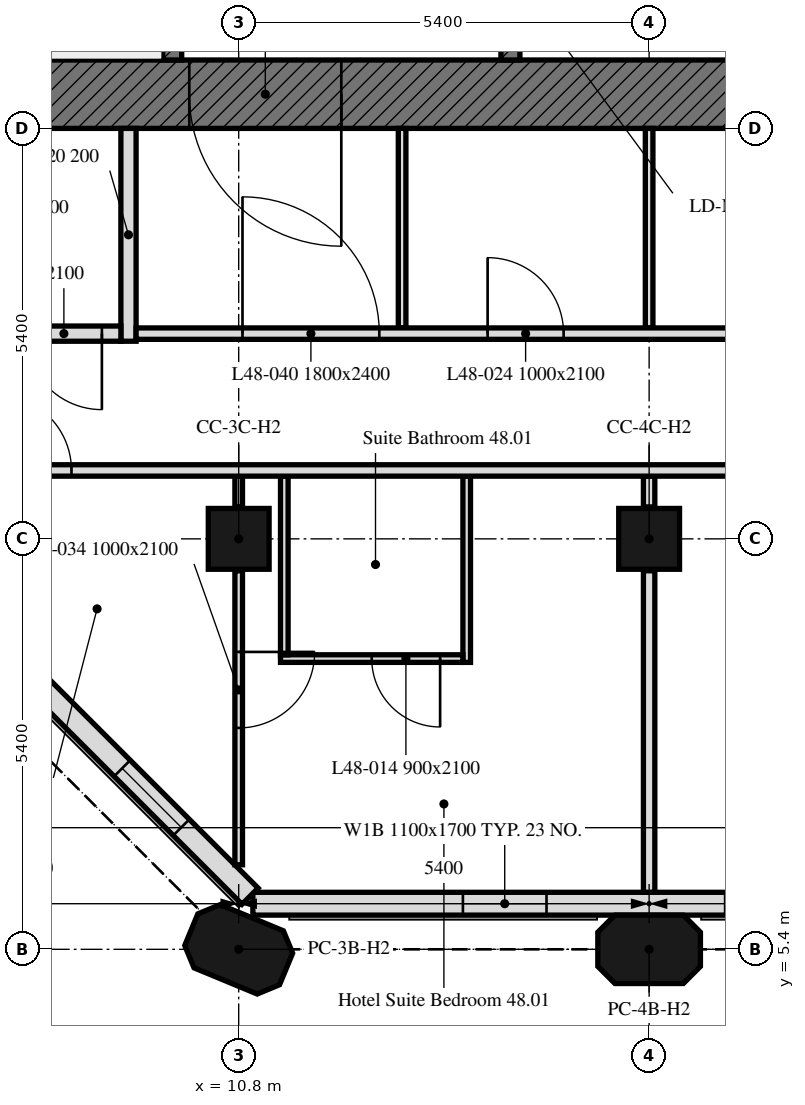
"""IFC4 building model, lengths in metres.
Left out: names, types, materials, properties, quantities, classifications, styles, units other than length and angle.
Written with IfcOpenShell. Run it as: python <this file> out.ifc"""

import sys

from ifc_helpers import new_model, si_unit, direction, frame, frame_2d, origin, origin_2d, place, context, subcontext, project, spatial, polyline, rectangle, outline, extrude, element, fill, save


model = new_model("IFC4")
c1 = context("Model", 3, precision=1e-05, world=origin(), true_north=direction((0.0, 1.0)))
c2 = subcontext(c1, "Body", "Model", "MODEL_VIEW")
j1 = project(units=[si_unit("LENGTHUNIT", "METRE"), si_unit("PLANEANGLEUNIT", "RADIAN")], contexts=[c1])
p1 = place(None, origin())
s1 = spatial("IfcSite", under=j1, at=p1, CompositionType="ELEMENT")
p2 = place(p1, origin())
s2 = spatial("IfcBuilding", under=s1, at=p2, CompositionType="ELEMENT")
p3 = place(p2, frame((0.0, 0.0, 197.2)))
s3 = spatial("IfcBuildingStorey", under=s2, at=p3, CompositionType="ELEMENT", Elevation=197.2)
for number, where, z_axis, x_axis in (
    (1, (10.8, 5.4, 0.0), (0.0, 0.0, 1.0), (-0.924, 0.383, 0.0)),
    (2, (16.2, 5.4, 0.0), (0.0, 0.0, 1.0), (1.0, 0.0, 0.0)),
):
    element("IfcColumn", number, at=place(p3, frame(where, z_axis=z_axis, x_axis=x_axis)), inside=s3, PredefinedType="COLUMN", context=c2, shape_type="SweptSolid", body=[
        extrude(outline(polyline([(-0.45, -0.45), (0.45, -0.45), (0.675, -0.225), (0.675, 0.225), (0.45, 0.45), (-0.45, 0.45), (-0.675, 0.225), (-0.675, -0.225), (-0.45, -0.45)])), origin(), (0.0, 0.0, 1.0), 3.0),
    ])
for number, where, z_axis, x_axis in (
    (3, (10.8, 10.8, 0.0), (0.0, 0.0, 1.0), (1.0, 0.0, 0.0)),
    (4, (16.2, 10.8, 0.0), (0.0, 0.0, 1.0), (1.0, 0.0, 0.0)),
):
    element("IfcColumn", number, at=place(p3, frame(where, z_axis=z_axis, x_axis=x_axis)), inside=s3, PredefinedType="COLUMN", context=c2, shape_type="SweptSolid", body=[
        extrude(rectangle(XDim=0.8, YDim=0.8, at=origin_2d()), origin(), (0.0, 0.0, 1.0), 3.0),
    ])
p4 = place(p3, frame((10.986, 6.0, 0.0), z_axis=(0.0, 0.0, 1.0), x_axis=(1.0, 0.0, 0.0)))
e5 = element("IfcWall", 5, at=p4, inside=s3, PredefinedType="SOLIDWALL", context=c2, shape_type="SweptSolid", body=[
    extrude(rectangle(XDim=32.027, YDim=0.3, at=frame_2d((16.014, 0.0))), origin(), (0.0, 0.0, 1.0), 3.0),
])
p5 = place(p4, frame((2.764, 0.0, 0.9)))
e6 = element("IfcOpeningElement", 6, at=p5, cuts=e5, PredefinedType="OPENING", context=c2, shape_type="SweptSolid", body=[
    extrude(rectangle(XDim=1.1, YDim=1.7, at=frame_2d((0.55, 0.85))), frame((0.0, 0.16, 0.0), z_axis=(0.0, -1.0, 0.0), x_axis=(1.0, 0.0, 0.0)), (0.0, 0.0, 1.0), 0.32),
])
p6 = place(p4, frame((6.214, 0.0, 0.9)))
e7 = element("IfcOpeningElement", 7, at=p6, cuts=e5, PredefinedType="OPENING", context=c2, shape_type="SweptSolid", body=[
    extrude(rectangle(XDim=3.4, YDim=1.7, at=frame_2d((1.7, 0.85))), frame((0.0, 0.16, 0.0), z_axis=(0.0, -1.0, 0.0), x_axis=(1.0, 0.0, 0.0)), (0.0, 0.0, 1.0), 0.32),
])
p7 = place(p4, frame((13.564, 0.0, 0.9)))
e8 = element("IfcOpeningElement", 8, at=p7, cuts=e5, PredefinedType="OPENING", context=c2, shape_type="SweptSolid", body=[
    extrude(rectangle(XDim=1.1, YDim=1.7, at=frame_2d((0.55, 0.85))), frame((0.0, 0.16, 0.0), z_axis=(0.0, -1.0, 0.0), x_axis=(1.0, 0.0, 0.0)), (0.0, 0.0, 1.0), 0.32),
])
p8 = place(p4, frame((17.014, 0.0, 0.9)))
e9 = element("IfcOpeningElement", 9, at=p8, cuts=e5, PredefinedType="OPENING", context=c2, shape_type="SweptSolid", body=[
    extrude(rectangle(XDim=3.4, YDim=1.7, at=frame_2d((1.7, 0.85))), frame((0.0, 0.16, 0.0), z_axis=(0.0, -1.0, 0.0), x_axis=(1.0, 0.0, 0.0)), (0.0, 0.0, 1.0), 0.32),
])
p9 = place(p4, frame((24.364, 0.0, 0.9)))
e10 = element("IfcOpeningElement", 10, at=p9, cuts=e5, PredefinedType="OPENING", context=c2, shape_type="SweptSolid", body=[
    extrude(rectangle(XDim=1.1, YDim=1.7, at=frame_2d((0.55, 0.85))), frame((0.0, 0.16, 0.0), z_axis=(0.0, -1.0, 0.0), x_axis=(1.0, 0.0, 0.0)), (0.0, 0.0, 1.0), 0.32),
])
p10 = place(p4, frame((27.814, 0.0, 0.9)))
e11 = element("IfcOpeningElement", 11, at=p10, cuts=e5, PredefinedType="OPENING", context=c2, shape_type="SweptSolid", body=[
    extrude(rectangle(XDim=3.4, YDim=1.7, at=frame_2d((1.7, 0.85))), frame((0.0, 0.16, 0.0), z_axis=(0.0, -1.0, 0.0), x_axis=(1.0, 0.0, 0.0)), (0.0, 0.0, 1.0), 0.32),
])
p11 = place(p3, frame((6.099, 10.949, 0.0), z_axis=(0.0, 0.0, 1.0), x_axis=(0.707106781187, -0.707106781187, 0.0)))
e12 = element("IfcWall", 12, at=p11, inside=s3, PredefinedType="SOLIDWALL", context=c2, shape_type="SweptSolid", body=[
    extrude(rectangle(XDim=6.86, YDim=0.3, at=frame_2d((3.43, 0.0))), origin(), (0.0, 0.0, 1.0), 3.0),
])
p12 = place(p11, frame((1.28, 0.0, 0.9)))
e13 = element("IfcOpeningElement", 13, at=p12, cuts=e12, PredefinedType="OPENING", context=c2, shape_type="SweptSolid", body=[
    extrude(rectangle(XDim=1.1, YDim=1.7, at=frame_2d((0.55, 0.85))), frame((0.0, 0.16, 0.0), z_axis=(0.0, -1.0, 0.0), x_axis=(1.0, 0.0, 0.0)), (0.0, 0.0, 1.0), 0.32),
])
p13 = place(p11, frame((4.48, 0.0, 0.9)))
e14 = element("IfcOpeningElement", 14, at=p13, cuts=e12, PredefinedType="OPENING", context=c2, shape_type="SweptSolid", body=[
    extrude(rectangle(XDim=1.1, YDim=1.7, at=frame_2d((0.55, 0.85))), frame((0.0, 0.16, 0.0), z_axis=(0.0, -1.0, 0.0), x_axis=(1.0, 0.0, 0.0)), (0.0, 0.0, 1.0), 0.32),
])
p14 = place(p3, frame((17.7, 16.65, 0.0), z_axis=(0.0, 0.0, 1.0), x_axis=(-1.0, 0.0, 0.0)))
e15 = element("IfcWall", 15, at=p14, inside=s3, PredefinedType="SOLIDWALL", context=c2, shape_type="SweptSolid", body=[
    extrude(rectangle(XDim=11.1, YDim=0.9, at=frame_2d((5.55, 0.0))), origin(), (0.0, 0.0, 1.0), 3.0),
])
p15 = place(p14, frame((5.55, 0.0, 0.0)))
e16 = element("IfcOpeningElement", 16, at=p15, cuts=e15, PredefinedType="OPENING", context=c2, shape_type="SweptSolid", body=[
    extrude(rectangle(XDim=2.0, YDim=2.4, at=frame_2d((1.0, 1.2))), frame((0.0, 0.45, 0.0), z_axis=(0.0, -1.0, 0.0), x_axis=(1.0, 0.0, 0.0)), (0.0, 0.0, 1.0), 0.9),
])
p16 = place(p3, frame((9.925, 17.1, 0.0), z_axis=(0.0, 0.0, 1.0), x_axis=(0.0, 1.0, 0.0)))
e17 = element("IfcWall", 17, at=p16, inside=s3, PredefinedType="SOLIDWALL", context=c2, shape_type="SweptSolid", body=[
    extrude(rectangle(XDim=14.4, YDim=0.25, at=frame_2d((7.2, 0.0))), origin(), (0.0, 0.0, 1.0), 3.0),
])
p17 = place(p16, frame((4.6, 0.0, 0.0)))
e18 = element("IfcOpeningElement", 18, at=p17, cuts=e17, PredefinedType="OPENING", context=c2, shape_type="SweptSolid", body=[
    extrude(rectangle(XDim=1.0, YDim=2.1, at=frame_2d((0.5, 1.05))), frame((0.0, 0.125, 0.0), z_axis=(0.0, -1.0, 0.0), x_axis=(1.0, 0.0, 0.0)), (0.0, 0.0, 1.0), 0.25),
])
p18 = place(p16, frame((7.062, 0.0, 0.0)))
e19 = element("IfcOpeningElement", 19, at=p18, cuts=e17, PredefinedType="OPENING", context=c2, shape_type="SweptSolid", body=[
    extrude(rectangle(XDim=1.2, YDim=2.1, at=frame_2d((0.6, 1.05))), frame((0.0, 0.125, 0.0), z_axis=(0.0, -1.0, 0.0), x_axis=(1.0, 0.0, 0.0)), (0.0, 0.0, 1.0), 0.25),
])
p19 = place(p16, frame((9.472, 0.0, 0.0)))
e20 = element("IfcOpeningElement", 20, at=p19, cuts=e17, PredefinedType="OPENING", context=c2, shape_type="SweptSolid", body=[
    extrude(rectangle(XDim=0.9, YDim=2.1, at=frame_2d((0.45, 1.05))), frame((0.0, 0.125, 0.0), z_axis=(0.0, -1.0, 0.0), x_axis=(1.0, 0.0, 0.0)), (0.0, 0.0, 1.0), 0.25),
])
p20 = place(p16, frame((10.779, 0.0, 0.0)))
e21 = element("IfcOpeningElement", 21, at=p20, cuts=e17, PredefinedType="OPENING", context=c2, shape_type="SweptSolid", body=[
    extrude(rectangle(XDim=0.9, YDim=2.1, at=frame_2d((0.45, 1.05))), frame((0.0, 0.125, 0.0), z_axis=(0.0, -1.0, 0.0), x_axis=(1.0, 0.0, 0.0)), (0.0, 0.0, 1.0), 0.25),
])
p21 = place(p16, frame((12.048, 0.0, 0.0)))
e22 = element("IfcOpeningElement", 22, at=p21, cuts=e17, PredefinedType="OPENING", context=c2, shape_type="SweptSolid", body=[
    extrude(rectangle(XDim=0.9, YDim=2.1, at=frame_2d((0.45, 1.05))), frame((0.0, 0.125, 0.0), z_axis=(0.0, -1.0, 0.0), x_axis=(1.0, 0.0, 0.0)), (0.0, 0.0, 1.0), 0.25),
])
p22 = place(p16, frame((13.354, 0.0, 0.0)))
e23 = element("IfcOpeningElement", 23, at=p22, cuts=e17, PredefinedType="OPENING", context=c2, shape_type="SweptSolid", body=[
    extrude(rectangle(XDim=0.9, YDim=2.1, at=frame_2d((0.45, 1.05))), frame((0.0, 0.125, 0.0), z_axis=(0.0, -1.0, 0.0), x_axis=(1.0, 0.0, 0.0)), (0.0, 0.0, 1.0), 0.25),
])
p23 = place(p3, frame((14.375, 17.1, 0.0), z_axis=(0.0, 0.0, 1.0), x_axis=(0.0, 1.0, 0.0)))
e24 = element("IfcWall", 24, at=p23, inside=s3, PredefinedType="SOLIDWALL", context=c2, shape_type="SweptSolid", body=[
    extrude(rectangle(XDim=14.4, YDim=0.25, at=frame_2d((7.2, 0.0))), origin(), (0.0, 0.0, 1.0), 3.0),
])
p24 = place(p23, frame((13.15, 0.0, 0.0)))
e25 = element("IfcOpeningElement", 25, at=p24, cuts=e24, PredefinedType="OPENING", context=c2, shape_type="SweptSolid", body=[
    extrude(rectangle(XDim=1.0, YDim=2.1, at=frame_2d((0.5, 1.05))), frame((0.0, 0.125, 0.0), z_axis=(0.0, -1.0, 0.0), x_axis=(1.0, 0.0, 0.0)), (0.0, 0.0, 1.0), 0.25),
])
p25 = place(p23, frame((0.6, 0.0, 0.0)))
e26 = element("IfcOpeningElement", 26, at=p25, cuts=e24, PredefinedType="OPENING", context=c2, shape_type="SweptSolid", body=[
    extrude(rectangle(XDim=1.1, YDim=2.1, at=frame_2d((0.55, 1.05))), frame((0.0, 0.125, 0.0), z_axis=(0.0, -1.0, 0.0), x_axis=(1.0, 0.0, 0.0)), (0.0, 0.0, 1.0), 0.25),
])
p26 = place(p23, frame((3.25, 0.0, 0.0)))
e27 = element("IfcOpeningElement", 27, at=p26, cuts=e24, PredefinedType="OPENING", context=c2, shape_type="SweptSolid", body=[
    extrude(rectangle(XDim=0.9, YDim=2.1, at=frame_2d((0.45, 1.05))), frame((0.0, 0.125, 0.0), z_axis=(0.0, -1.0, 0.0), x_axis=(1.0, 0.0, 0.0)), (0.0, 0.0, 1.0), 0.25),
])
p27 = place(p3, frame((16.2, 6.151, 0.0), z_axis=(0.0, 0.0, 1.0), x_axis=(0.0, 1.0, 0.0)))
e28 = element("IfcWall", 28, at=p27, inside=s3, PredefinedType="PARTITIONING", context=c2, shape_type="SweptSolid", body=[
    extrude(rectangle(XDim=4.229, YDim=0.15, at=frame_2d((2.115, 0.0))), origin(), (0.0, 0.0, 1.0), 3.0),
])
p28 = place(p3, frame((16.2, 11.22, 0.0), z_axis=(0.0, 0.0, 1.0), x_axis=(0.0, 1.0, 0.0)))
e29 = element("IfcWall", 29, at=p28, inside=s3, PredefinedType="PARTITIONING", context=c2, shape_type="SweptSolid", body=[
    extrude(rectangle(XDim=0.405, YDim=0.15, at=frame_2d((0.203, 0.0))), origin(), (0.0, 0.0, 1.0), 3.0),
])
p29 = place(p3, frame((13.8, 11.625, 0.0), z_axis=(0.0, 0.0, 1.0), x_axis=(0.0, -1.0, 0.0)))
e30 = element("IfcWall", 30, at=p29, inside=s3, PredefinedType="PARTITIONING", context=c2, shape_type="SweptSolid", body=[
    extrude(rectangle(XDim=2.45, YDim=0.1, at=frame_2d((1.225, 0.0))), origin(), (0.0, 0.0, 1.0), 3.0),
])
p30 = place(p3, frame((13.75, 9.225, 0.0), z_axis=(0.0, 0.0, 1.0), x_axis=(-1.0, 0.0, 0.0)))
e31 = element("IfcWall", 31, at=p30, inside=s3, PredefinedType="PARTITIONING", context=c2, shape_type="SweptSolid", body=[
    extrude(rectangle(XDim=2.4, YDim=0.1, at=frame_2d((1.2, 0.0))), origin(), (0.0, 0.0, 1.0), 3.0),
])
p31 = place(p30, frame((0.3, 0.0, 0.0)))
e32 = element("IfcOpeningElement", 32, at=p31, cuts=e31, PredefinedType="OPENING", context=c2, shape_type="SweptSolid", body=[
    extrude(rectangle(XDim=0.9, YDim=2.1, at=frame_2d((0.45, 1.05))), frame((0.0, 0.05, 0.0), z_axis=(0.0, -1.0, 0.0), x_axis=(1.0, 0.0, 0.0)), (0.0, 0.0, 1.0), 0.1),
])
p32 = place(p3, frame((11.4, 9.275, 0.0), z_axis=(0.0, 0.0, 1.0), x_axis=(0.0, 1.0, 0.0)))
e33 = element("IfcWall", 33, at=p32, inside=s3, PredefinedType="PARTITIONING", context=c2, shape_type="SweptSolid", body=[
    extrude(rectangle(XDim=2.35, YDim=0.1, at=frame_2d((1.175, 0.0))), origin(), (0.0, 0.0, 1.0), 3.0),
])
p33 = place(p3, frame((10.8, 11.625, 0.0), z_axis=(0.0, 0.0, 1.0), x_axis=(0.0, -1.0, 0.0)))
e34 = element("IfcWall", 34, at=p33, inside=s3, PredefinedType="PARTITIONING", context=c2, shape_type="SweptSolid", body=[
    extrude(rectangle(XDim=0.405, YDim=0.1, at=frame_2d((0.203, 0.0))), origin(), (0.0, 0.0, 1.0), 3.0),
])
p34 = place(p3, frame((10.8, 10.38, 0.0), z_axis=(0.0, 0.0, 1.0), x_axis=(0.0, -1.0, 0.0)))
e35 = element("IfcWall", 35, at=p34, inside=s3, PredefinedType="PARTITIONING", context=c2, shape_type="SweptSolid", body=[
    extrude(rectangle(XDim=3.868, YDim=0.1, at=frame_2d((1.934, 0.0))), origin(), (0.0, 0.0, 1.0), 3.0),
])
p35 = place(p34, frame((1.067, 0.0, 0.0)))
e36 = element("IfcOpeningElement", 36, at=p35, cuts=e35, PredefinedType="OPENING", context=c2, shape_type="SweptSolid", body=[
    extrude(rectangle(XDim=1.0, YDim=2.1, at=frame_2d((0.5, 1.05))), frame((0.0, 0.05, 0.0), z_axis=(0.0, -1.0, 0.0), x_axis=(1.0, 0.0, 0.0)), (0.0, 0.0, 1.0), 0.1),
])
p36 = place(p3, frame((6.151, 11.7, 0.0), z_axis=(0.0, 0.0, 1.0), x_axis=(1.0, 0.0, 0.0)))
e37 = element("IfcWall", 37, at=p36, inside=s3, PredefinedType="PARTITIONING", context=c2, shape_type="SweptSolid", body=[
    extrude(rectangle(XDim=41.698, YDim=0.15, at=frame_2d((20.849, 0.0))), origin(), (0.0, 0.0, 1.0), 3.0),
])
p37 = place(p36, frame((17.649, 0.0, 0.0)))
e38 = element("IfcOpeningElement", 38, at=p37, cuts=e37, PredefinedType="OPENING", context=c2, shape_type="SweptSolid", body=[
    extrude(rectangle(XDim=1.0, YDim=2.1, at=frame_2d((0.5, 1.05))), frame((0.0, 0.075, 0.0), z_axis=(0.0, -1.0, 0.0), x_axis=(1.0, 0.0, 0.0)), (0.0, 0.0, 1.0), 0.15),
])
p38 = place(p36, frame((1.449, 0.0, 0.0)))
e39 = element("IfcOpeningElement", 39, at=p38, cuts=e37, PredefinedType="OPENING", context=c2, shape_type="SweptSolid", body=[
    extrude(rectangle(XDim=1.0, YDim=2.1, at=frame_2d((0.5, 1.05))), frame((0.0, 0.075, 0.0), z_axis=(0.0, -1.0, 0.0), x_axis=(1.0, 0.0, 0.0)), (0.0, 0.0, 1.0), 0.15),
])
p39 = place(p36, frame((29.249, 0.0, 0.0)))
e40 = element("IfcOpeningElement", 40, at=p39, cuts=e37, PredefinedType="OPENING", context=c2, shape_type="SweptSolid", body=[
    extrude(rectangle(XDim=1.0, YDim=2.1, at=frame_2d((0.5, 1.05))), frame((0.0, 0.075, 0.0), z_axis=(0.0, -1.0, 0.0), x_axis=(1.0, 0.0, 0.0)), (0.0, 0.0, 1.0), 0.15),
])
p40 = place(p36, frame((37.954, 0.0, 0.0)))
e41 = element("IfcOpeningElement", 41, at=p40, cuts=e37, PredefinedType="OPENING", context=c2, shape_type="SweptSolid", body=[
    extrude(rectangle(XDim=1.0, YDim=2.1, at=frame_2d((0.5, 1.05))), frame((0.0, 0.075, 0.0), z_axis=(0.0, -1.0, 0.0), x_axis=(1.0, 0.0, 0.0)), (0.0, 0.0, 1.0), 0.15),
])
p41 = place(p3, frame((16.2, 16.2, 0.0), z_axis=(0.0, 0.0, 1.0), x_axis=(0.0, -1.0, 0.0)))
e42 = element("IfcWall", 42, at=p41, inside=s3, PredefinedType="PARTITIONING", context=c2, shape_type="SweptSolid", body=[
    extrude(rectangle(XDim=2.625, YDim=0.1, at=frame_2d((1.312, 0.0))), origin(), (0.0, 0.0, 1.0), 3.0),
])
p42 = place(p3, frame((9.35, 16.2, 0.0), z_axis=(0.0, 0.0, 1.0), x_axis=(0.0, -1.0, 0.0)))
e43 = element("IfcWall", 43, at=p42, inside=s3, PredefinedType="PARTITIONING", context=c2, shape_type="SweptSolid", body=[
    extrude(rectangle(XDim=2.8, YDim=0.2, at=frame_2d((1.4, 0.0))), origin(), (0.0, 0.0, 1.0), 3.0),
])
p43 = place(p3, frame((12.95, 13.575, 0.0), z_axis=(0.0, 0.0, 1.0), x_axis=(0.0, 1.0, 0.0)))
e44 = element("IfcWall", 44, at=p43, inside=s3, PredefinedType="PARTITIONING", context=c2, shape_type="SweptSolid", body=[
    extrude(rectangle(XDim=2.625, YDim=0.1, at=frame_2d((1.312, 0.0))), origin(), (0.0, 0.0, 1.0), 3.0),
])
p44 = place(p3, frame((9.45, 13.5, 0.0), z_axis=(0.0, 0.0, 1.0), x_axis=(1.0, 0.0, 0.0)))
e45 = element("IfcWall", 45, at=p44, inside=s3, PredefinedType="PARTITIONING", context=c2, shape_type="SweptSolid", body=[
    extrude(rectangle(XDim=33.675, YDim=0.15, at=frame_2d((16.837, 0.0))), origin(), (0.0, 0.0, 1.0), 3.0),
])
p45 = place(p44, frame((8.95, 0.0, 0.0)))
e46 = element("IfcOpeningElement", 46, at=p45, cuts=e45, PredefinedType="OPENING", context=c2, shape_type="SweptSolid", body=[
    extrude(rectangle(XDim=1.0, YDim=2.1, at=frame_2d((0.5, 1.05))), frame((0.0, 0.075, 0.0), z_axis=(0.0, -1.0, 0.0), x_axis=(1.0, 0.0, 0.0)), (0.0, 0.0, 1.0), 0.15),
])
p46 = place(p44, frame((15.517, 0.0, 0.0)))
e47 = element("IfcOpeningElement", 47, at=p46, cuts=e45, PredefinedType="OPENING", context=c2, shape_type="SweptSolid", body=[
    extrude(rectangle(XDim=1.0, YDim=2.1, at=frame_2d((0.5, 1.05))), frame((0.0, 0.075, 0.0), z_axis=(0.0, -1.0, 0.0), x_axis=(1.0, 0.0, 0.0)), (0.0, 0.0, 1.0), 0.15),
])
p47 = place(p44, frame((24.075, 0.0, 0.0)))
e48 = element("IfcOpeningElement", 48, at=p47, cuts=e45, PredefinedType="OPENING", context=c2, shape_type="SweptSolid", body=[
    extrude(rectangle(XDim=1.0, YDim=2.1, at=frame_2d((0.5, 1.05))), frame((0.0, 0.075, 0.0), z_axis=(0.0, -1.0, 0.0), x_axis=(1.0, 0.0, 0.0)), (0.0, 0.0, 1.0), 0.15),
])
p48 = place(p44, frame((31.275, 0.0, 0.0)))
e49 = element("IfcOpeningElement", 49, at=p48, cuts=e45, PredefinedType="OPENING", context=c2, shape_type="SweptSolid", body=[
    extrude(rectangle(XDim=1.0, YDim=2.1, at=frame_2d((0.5, 1.05))), frame((0.0, 0.075, 0.0), z_axis=(0.0, -1.0, 0.0), x_axis=(1.0, 0.0, 0.0)), (0.0, 0.0, 1.0), 0.15),
])
p49 = place(p44, frame((4.625, 0.0, 0.0)))
e50 = element("IfcOpeningElement", 50, at=p49, cuts=e45, PredefinedType="OPENING", context=c2, shape_type="SweptSolid", body=[
    extrude(rectangle(XDim=1.0, YDim=2.1, at=frame_2d((0.5, 1.05))), frame((0.0, 0.075, 0.0), z_axis=(0.0, -1.0, 0.0), x_axis=(1.0, 0.0, 0.0)), (0.0, 0.0, 1.0), 0.15),
])
p50 = place(p44, frame((1.4, 0.0, 0.0)))
e51 = element("IfcOpeningElement", 51, at=p50, cuts=e45, PredefinedType="OPENING", context=c2, shape_type="SweptSolid", body=[
    extrude(rectangle(XDim=1.8, YDim=2.4, at=frame_2d((0.9, 1.2))), frame((0.0, 0.075, 0.0), z_axis=(0.0, -1.0, 0.0), x_axis=(1.0, 0.0, 0.0)), (0.0, 0.0, 1.0), 0.15),
])
p51 = place(p44, frame((26.5, 0.0, 0.0)))
e52 = element("IfcOpeningElement", 52, at=p51, cuts=e45, PredefinedType="OPENING", context=c2, shape_type="SweptSolid", body=[
    extrude(rectangle(XDim=1.8, YDim=2.4, at=frame_2d((0.9, 1.2))), frame((0.0, 0.075, 0.0), z_axis=(0.0, -1.0, 0.0), x_axis=(1.0, 0.0, 0.0)), (0.0, 0.0, 1.0), 0.15),
])
p52 = place(p3, frame((9.25, 13.5, 0.0), z_axis=(0.0, 0.0, 1.0), x_axis=(-1.0, 0.0, 0.0)))
e53 = element("IfcWall", 53, at=p52, inside=s3, PredefinedType="PARTITIONING", context=c2, shape_type="SweptSolid", body=[
    extrude(rectangle(XDim=3.099, YDim=0.2, at=frame_2d((1.55, 0.0))), origin(), (0.0, 0.0, 1.0), 3.0),
])
p53 = place(p52, frame((0.25, 0.0, 0.0)))
e54 = element("IfcOpeningElement", 54, at=p53, cuts=e53, PredefinedType="OPENING", context=c2, shape_type="SweptSolid", body=[
    extrude(rectangle(XDim=1.0, YDim=2.1, at=frame_2d((0.5, 1.05))), frame((0.0, 0.1, 0.0), z_axis=(0.0, -1.0, 0.0), x_axis=(1.0, 0.0, 0.0)), (0.0, 0.0, 1.0), 0.2),
])
p54 = place(p5, origin())
e55 = element("IfcWindow", 55, at=p54, inside=s3, PartitioningType="SINGLE_PANEL", PredefinedType="WINDOW", context=c2, shape_type="SweptSolid", body=[
    extrude(rectangle(XDim=1.1, YDim=1.7, at=frame_2d((0.55, 0.85))), frame((0.0, 0.03, 0.0), z_axis=(0.0, -1.0, 0.0), x_axis=(1.0, 0.0, 0.0)), (0.0, 0.0, 1.0), 0.06),
])
fill(e6, e55)
p55 = place(p13, origin())
e56 = element("IfcWindow", 56, at=p55, inside=s3, PartitioningType="SINGLE_PANEL", PredefinedType="WINDOW", context=c2, shape_type="SweptSolid", body=[
    extrude(rectangle(XDim=1.1, YDim=1.7, at=frame_2d((0.55, 0.85))), frame((0.0, 0.03, 0.0), z_axis=(0.0, -1.0, 0.0), x_axis=(1.0, 0.0, 0.0)), (0.0, 0.0, 1.0), 0.06),
])
fill(e14, e56)
p56 = place(p15, origin())
e57 = element("IfcDoor", 57, at=p56, inside=s3, OperationType="DOUBLE_DOOR_SINGLE_SWING", PredefinedType="DOOR", context=c2, shape_type="SweptSolid", body=[
    extrude(rectangle(XDim=2.0, YDim=2.4, at=frame_2d((1.0, 1.2))), frame((0.0, 0.025, 0.0), z_axis=(0.0, -1.0, 0.0), x_axis=(1.0, 0.0, 0.0)), (0.0, 0.0, 1.0), 0.05),
])
fill(e16, e57)
p57 = place(p31, origin())
e58 = element("IfcDoor", 58, at=p57, inside=s3, OperationType="SINGLE_SWING_RIGHT", PredefinedType="DOOR", context=c2, shape_type="SweptSolid", body=[
    extrude(rectangle(XDim=0.9, YDim=2.1, at=frame_2d((0.45, 1.05))), frame((0.0, 0.025, 0.0), z_axis=(0.0, -1.0, 0.0), x_axis=(1.0, 0.0, 0.0)), (0.0, 0.0, 1.0), 0.05),
])
fill(e32, e58)
p58 = place(p53, origin())
e59 = element("IfcDoor", 59, at=p58, inside=s3, OperationType="SINGLE_SWING_RIGHT", PredefinedType="DOOR", context=c2, shape_type="SweptSolid", body=[
    extrude(rectangle(XDim=1.0, YDim=2.1, at=frame_2d((0.5, 1.05))), frame((0.0, 0.025, 0.0), z_axis=(0.0, -1.0, 0.0), x_axis=(1.0, 0.0, 0.0)), (0.0, 0.0, 1.0), 0.05),
])
fill(e54, e59)
p59 = place(p49, origin())
e60 = element("IfcDoor", 60, at=p59, inside=s3, OperationType="SINGLE_SWING_LEFT", PredefinedType="DOOR", context=c2, shape_type="SweptSolid", body=[
    extrude(rectangle(XDim=1.0, YDim=2.1, at=frame_2d((0.5, 1.05))), frame((0.0, 0.025, 0.0), z_axis=(0.0, -1.0, 0.0), x_axis=(1.0, 0.0, 0.0)), (0.0, 0.0, 1.0), 0.05),
])
fill(e50, e60)
p60 = place(p35, origin())
e61 = element("IfcDoor", 61, at=p60, inside=s3, OperationType="SINGLE_SWING_RIGHT", PredefinedType="DOOR", context=c2, shape_type="SweptSolid", body=[
    extrude(rectangle(XDim=1.0, YDim=2.1, at=frame_2d((0.5, 1.05))), frame((0.0, 0.025, 0.0), z_axis=(0.0, -1.0, 0.0), x_axis=(1.0, 0.0, 0.0)), (0.0, 0.0, 1.0), 0.05),
])
fill(e36, e61)
p61 = place(p38, origin())
e62 = element("IfcDoor", 62, at=p61, inside=s3, OperationType="SINGLE_SWING_LEFT", PredefinedType="DOOR", context=c2, shape_type="SweptSolid", body=[
    extrude(rectangle(XDim=1.0, YDim=2.1, at=frame_2d((0.5, 1.05))), frame((0.0, 0.025, 0.0), z_axis=(0.0, -1.0, 0.0), x_axis=(1.0, 0.0, 0.0)), (0.0, 0.0, 1.0), 0.05),
])
fill(e39, e62)
p62 = place(p50, origin())
e63 = element("IfcDoor", 63, at=p62, inside=s3, OperationType="DOUBLE_DOOR_SINGLE_SWING", PredefinedType="DOOR", context=c2, shape_type="SweptSolid", body=[
    extrude(rectangle(XDim=1.8, YDim=2.4, at=frame_2d((0.9, 1.2))), frame((0.0, 0.025, 0.0), z_axis=(0.0, -1.0, 0.0), x_axis=(1.0, 0.0, 0.0)), (0.0, 0.0, 1.0), 0.05),
])
fill(e51, e63)
save(model, sys.argv[1])
